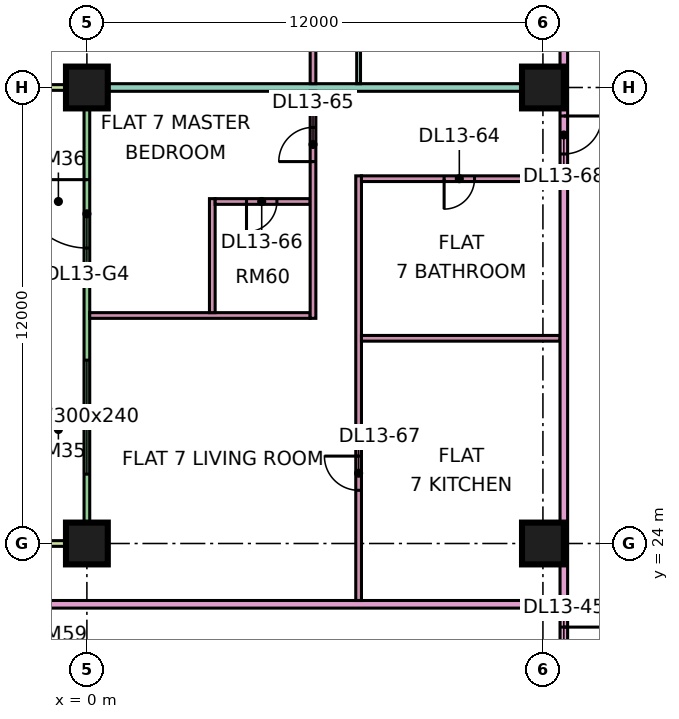
"""IFC4 building model, lengths in metres.
Left out: names, types, materials, properties, quantities, classifications, styles, units other than length and angle.
Written with IfcOpenShell. Run it as: python <this file> out.ifc"""

import sys

from ifc_helpers import new_model, si_unit, direction, frame, frame_2d, origin, origin_2d, place, context, subcontext, project, spatial, rectangle, extrude, element, fill, save


model = new_model("IFC4")
c1 = context("Model", 3, precision=1e-05, world=origin(), true_north=direction((0.0, 1.0)))
c2 = subcontext(c1, "Body", "Model", "MODEL_VIEW")
j1 = project(units=[si_unit("LENGTHUNIT", "METRE"), si_unit("PLANEANGLEUNIT", "RADIAN")], contexts=[c1])
p1 = place(None, origin())
s1 = spatial("IfcSite", under=j1, at=p1, CompositionType="ELEMENT")
p2 = place(p1, origin())
s2 = spatial("IfcBuilding", under=s1, at=p2, CompositionType="ELEMENT")
p3 = place(p2, frame((0.0, 0.0, 63.9)))
s3 = spatial("IfcBuildingStorey", under=s2, at=p3, CompositionType="ELEMENT", Elevation=63.9)
p4 = place(p3, frame((0.0, 24.0, 0.0), z_axis=(0.0, 0.0, 1.0), x_axis=(1.0, 0.0, 0.0)))
e1 = element("IfcColumn", 1, at=p4, inside=s3, PredefinedType="COLUMN", context=c2, shape_type="SweptSolid", body=[
    extrude(rectangle(XDim=1.1, YDim=1.1, at=origin_2d()), origin(), (0.0, 0.0, 1.0), 3.75),
])
p5 = place(p3, frame((0.0, 36.0, 0.0), z_axis=(0.0, 0.0, 1.0), x_axis=(1.0, 0.0, 0.0)))
e2 = element("IfcColumn", 2, at=p5, inside=s3, PredefinedType="COLUMN", context=c2, shape_type="SweptSolid", body=[
    extrude(rectangle(XDim=1.1, YDim=1.1, at=origin_2d()), origin(), (0.0, 0.0, 1.0), 3.75),
])
for number, where, z_axis, x_axis in (
    (3, (12.0, 24.0, 0.0), (0.0, 0.0, 1.0), (1.0, 0.0, 0.0)),
    (4, (12.0, 36.0, 0.0), (0.0, 0.0, 1.0), (1.0, 0.0, 0.0)),
):
    element("IfcColumn", number, at=place(p3, frame(where, z_axis=z_axis, x_axis=x_axis)), inside=s3, PredefinedType="COLUMN", context=c2, shape_type="SweptSolid", body=[
        extrude(rectangle(XDim=1.1, YDim=1.1, at=origin_2d()), origin(), (0.0, 0.0, 1.0), 3.75),
    ])
p6 = place(p3, frame((0.0, 35.925, 0.0), z_axis=(0.0, 0.0, 1.0), x_axis=(0.0, -1.0, 0.0)))
e5 = element("IfcWall", 5, at=p6, inside=s3, PredefinedType="SOLIDWALL", context=c2, shape_type="SweptSolid", body=[
    extrude(rectangle(XDim=11.85, YDim=0.15, at=frame_2d((5.925, 0.0))), origin(), (0.0, 0.0, 1.0), 3.35),
])
p7 = place(p6, frame((2.35, 0.0, 0.0)))
e6 = element("IfcOpeningElement", 6, at=p7, cuts=e5, PredefinedType="OPENING", context=c2, shape_type="SweptSolid", body=[
    extrude(rectangle(XDim=1.8, YDim=2.4, at=frame_2d((0.9, 1.2))), frame((0.0, 0.085, 0.0), z_axis=(0.0, -1.0, 0.0), x_axis=(1.0, 0.0, 0.0)), (0.0, 0.0, 1.0), 0.17),
])
p8 = place(p6, frame((7.1, 0.0, 0.45)))
e7 = element("IfcOpeningElement", 7, at=p8, cuts=e5, PredefinedType="OPENING", context=c2, shape_type="SweptSolid", body=[
    extrude(rectangle(XDim=3.0, YDim=2.4, at=frame_2d((1.5, 1.2))), frame((0.0, 0.085, 0.0), z_axis=(0.0, -1.0, 0.0), x_axis=(1.0, 0.0, 0.0)), (0.0, 0.0, 1.0), 0.17),
])
for number, where, z_axis, x_axis in (
    (8, (-1.5, 36.0, 0.0), (0.0, 0.0, 1.0), (1.0, 0.0, 0.0)),
    (9, (-1.5, 24.0, 0.0), (0.0, 0.0, 1.0), (1.0, 0.0, 0.0)),
):
    element("IfcWall", number, at=place(p3, frame(where, z_axis=z_axis, x_axis=x_axis)), inside=s3, PredefinedType="SOLIDWALL", context=c2, shape_type="SweptSolid", body=[
        extrude(rectangle(XDim=1.5, YDim=0.15, at=frame_2d((0.75, 0.0))), origin(), (0.0, 0.0, 1.0), 3.35),
    ])
p9 = place(p3, frame((-1.35, 22.4, 0.0), z_axis=(0.0, 0.0, 1.0), x_axis=(1.0, 0.0, 0.0)))
e10 = element("IfcWall", 10, at=p9, inside=s3, PredefinedType="PARTITIONING", context=c2, shape_type="SweptSolid", body=[
    extrude(rectangle(XDim=13.8, YDim=0.2, at=frame_2d((6.9, 0.0))), origin(), (0.0, 0.0, 1.0), 3.35),
])
e11 = element("IfcWall", 11, at=p5, inside=s3, PredefinedType="PARTITIONING", context=c2, shape_type="SweptSolid", body=[
    extrude(rectangle(XDim=12.45, YDim=0.2, at=frame_2d((6.225, 0.0))), origin(), (0.0, 0.0, 1.0), 3.35),
])
p10 = place(p3, frame((0.074, 30.0, 0.0), z_axis=(0.0, 0.0, 1.0), x_axis=(1.0, 0.0, 0.0)))
e12 = element("IfcWall", 12, at=p10, inside=s3, PredefinedType="PARTITIONING", context=c2, shape_type="SweptSolid", body=[
    extrude(rectangle(XDim=5.801, YDim=0.15, at=frame_2d((2.9, 0.0))), origin(), (0.0, 0.0, 1.0), 3.35),
])
p11 = place(p3, frame((3.3, 30.075, 0.0), z_axis=(0.0, 0.0, 1.0), x_axis=(0.0, 1.0, 0.0)))
e13 = element("IfcWall", 13, at=p11, inside=s3, PredefinedType="PARTITIONING", context=c2, shape_type="SweptSolid", body=[
    extrude(rectangle(XDim=3.0, YDim=0.15, at=frame_2d((1.5, 0.0))), origin(), (0.0, 0.0, 1.0), 3.35),
])
p12 = place(p3, frame((3.375, 33.0, 0.0), z_axis=(0.0, 0.0, 1.0), x_axis=(1.0, 0.0, 0.0)))
e14 = element("IfcWall", 14, at=p12, inside=s3, PredefinedType="PARTITIONING", context=c2, shape_type="SweptSolid", body=[
    extrude(rectangle(XDim=2.5, YDim=0.15, at=frame_2d((1.25, 0.0))), origin(), (0.0, 0.0, 1.0), 3.35),
])
p13 = place(p12, frame((0.825, 0.0, 0.0)))
e15 = element("IfcOpeningElement", 15, at=p13, cuts=e14, PredefinedType="OPENING", context=c2, shape_type="SweptSolid", body=[
    extrude(rectangle(XDim=0.8, YDim=2.1, at=frame_2d((0.4, 1.05))), frame((0.0, 0.085, 0.0), z_axis=(0.0, -1.0, 0.0), x_axis=(1.0, 0.0, 0.0)), (0.0, 0.0, 1.0), 0.17),
])
p14 = place(p3, frame((5.95, 29.925, 0.0), z_axis=(0.0, 0.0, 1.0), x_axis=(0.0, 1.0, 0.0)))
e16 = element("IfcWall", 16, at=p14, inside=s3, PredefinedType="PARTITIONING", context=c2, shape_type="SweptSolid", body=[
    extrude(rectangle(XDim=5.975, YDim=0.15, at=frame_2d((2.987, 0.0))), origin(), (0.0, 0.0, 1.0), 3.35),
])
p15 = place(p14, frame((4.125, 0.0, 0.0)))
e17 = element("IfcOpeningElement", 17, at=p15, cuts=e16, PredefinedType="OPENING", context=c2, shape_type="SweptSolid", body=[
    extrude(rectangle(XDim=0.9, YDim=2.1, at=frame_2d((0.45, 1.05))), frame((0.0, 0.085, 0.0), z_axis=(0.0, -1.0, 0.0), x_axis=(1.0, 0.0, 0.0)), (0.0, 0.0, 1.0), 0.17),
])
p16 = place(p3, frame((5.95, 36.1, 0.0), z_axis=(0.0, 0.0, 1.0), x_axis=(0.0, 1.0, 0.0)))
e18 = element("IfcWall", 18, at=p16, inside=s3, PredefinedType="PARTITIONING", context=c2, shape_type="SweptSolid", body=[
    extrude(rectangle(XDim=26.826, YDim=0.15, at=frame_2d((13.413, 0.0))), origin(), (0.0, 0.0, 1.0), 3.35),
])
p17 = place(p16, frame((0.95, 0.0, 0.0)))
e19 = element("IfcOpeningElement", 19, at=p17, cuts=e18, PredefinedType="OPENING", context=c2, shape_type="SweptSolid", body=[
    extrude(rectangle(XDim=0.9, YDim=2.1, at=frame_2d((0.45, 1.05))), frame((0.0, 0.085, 0.0), z_axis=(0.0, -1.0, 0.0), x_axis=(1.0, 0.0, 0.0)), (0.0, 0.0, 1.0), 0.17),
])
p18 = place(p16, frame((3.95, 0.0, 0.0)))
e20 = element("IfcOpeningElement", 20, at=p18, cuts=e18, PredefinedType="OPENING", context=c2, shape_type="SweptSolid", body=[
    extrude(rectangle(XDim=0.9, YDim=2.1, at=frame_2d((0.45, 1.05))), frame((0.0, 0.085, 0.0), z_axis=(0.0, -1.0, 0.0), x_axis=(1.0, 0.0, 0.0)), (0.0, 0.0, 1.0), 0.17),
])
p19 = place(p16, frame((6.95, 0.0, 0.0)))
e21 = element("IfcOpeningElement", 21, at=p19, cuts=e18, PredefinedType="OPENING", context=c2, shape_type="SweptSolid", body=[
    extrude(rectangle(XDim=0.9, YDim=2.1, at=frame_2d((0.45, 1.05))), frame((0.0, 0.085, 0.0), z_axis=(0.0, -1.0, 0.0), x_axis=(1.0, 0.0, 0.0)), (0.0, 0.0, 1.0), 0.17),
])
p20 = place(p16, frame((9.95, 0.0, 0.0)))
e22 = element("IfcOpeningElement", 22, at=p20, cuts=e18, PredefinedType="OPENING", context=c2, shape_type="SweptSolid", body=[
    extrude(rectangle(XDim=0.9, YDim=2.1, at=frame_2d((0.45, 1.05))), frame((0.0, 0.085, 0.0), z_axis=(0.0, -1.0, 0.0), x_axis=(1.0, 0.0, 0.0)), (0.0, 0.0, 1.0), 0.17),
])
p21 = place(p16, frame((18.95, 0.0, 0.0)))
e23 = element("IfcOpeningElement", 23, at=p21, cuts=e18, PredefinedType="OPENING", context=c2, shape_type="SweptSolid", body=[
    extrude(rectangle(XDim=0.9, YDim=2.1, at=frame_2d((0.45, 1.05))), frame((0.0, 0.085, 0.0), z_axis=(0.0, -1.0, 0.0), x_axis=(1.0, 0.0, 0.0)), (0.0, 0.0, 1.0), 0.17),
])
p22 = place(p16, frame((23.45, 0.0, 0.0)))
e24 = element("IfcOpeningElement", 24, at=p22, cuts=e18, PredefinedType="OPENING", context=c2, shape_type="SweptSolid", body=[
    extrude(rectangle(XDim=0.9, YDim=2.1, at=frame_2d((0.45, 1.05))), frame((0.0, 0.085, 0.0), z_axis=(0.0, -1.0, 0.0), x_axis=(1.0, 0.0, 0.0)), (0.0, 0.0, 1.0), 0.17),
])
p23 = place(p16, frame((15.55, 0.0, 0.0)))
e25 = element("IfcOpeningElement", 25, at=p23, cuts=e18, PredefinedType="OPENING", context=c2, shape_type="SweptSolid", body=[
    extrude(rectangle(XDim=1.6, YDim=2.1, at=frame_2d((0.8, 1.05))), frame((0.0, 0.085, 0.0), z_axis=(0.0, -1.0, 0.0), x_axis=(1.0, 0.0, 0.0)), (0.0, 0.0, 1.0), 0.17),
])
p24 = place(p16, frame((12.95, 0.0, 0.0)))
e26 = element("IfcOpeningElement", 26, at=p24, cuts=e18, PredefinedType="OPENING", context=c2, shape_type="SweptSolid", body=[
    extrude(rectangle(XDim=0.9, YDim=2.1, at=frame_2d((0.45, 1.05))), frame((0.0, 0.085, 0.0), z_axis=(0.0, -1.0, 0.0), x_axis=(1.0, 0.0, 0.0)), (0.0, 0.0, 1.0), 0.17),
])
p25 = place(p3, frame((7.15, 22.5, 0.0), z_axis=(0.0, 0.0, 1.0), x_axis=(0.0, 1.0, 0.0)))
e27 = element("IfcWall", 27, at=p25, inside=s3, PredefinedType="PARTITIONING", context=c2, shape_type="SweptSolid", body=[
    extrude(rectangle(XDim=11.175, YDim=0.15, at=frame_2d((5.587, 0.0))), origin(), (0.0, 0.0, 1.0), 3.35),
])
p26 = place(p25, frame((2.9, 0.0, 0.0)))
e28 = element("IfcOpeningElement", 28, at=p26, cuts=e27, PredefinedType="OPENING", context=c2, shape_type="SweptSolid", body=[
    extrude(rectangle(XDim=0.9, YDim=2.1, at=frame_2d((0.45, 1.05))), frame((0.0, 0.085, 0.0), z_axis=(0.0, -1.0, 0.0), x_axis=(1.0, 0.0, 0.0)), (0.0, 0.0, 1.0), 0.17),
])
p27 = place(p3, frame((7.15, 36.1, 0.0), z_axis=(0.0, 0.0, 1.0), x_axis=(0.0, 1.0, 0.0)))
e29 = element("IfcWall", 29, at=p27, inside=s3, PredefinedType="PARTITIONING", context=c2, shape_type="SweptSolid", body=[
    extrude(rectangle(XDim=8.35, YDim=0.1, at=frame_2d((4.175, 0.0))), origin(), (0.0, 0.0, 1.0), 3.35),
])
p28 = place(p27, frame((3.65, 0.0, 0.0)))
e30 = element("IfcOpeningElement", 30, at=p28, cuts=e29, PredefinedType="OPENING", context=c2, shape_type="SweptSolid", body=[
    extrude(rectangle(XDim=0.9, YDim=2.1, at=frame_2d((0.45, 1.05))), frame((0.0, 0.06, 0.0), z_axis=(0.0, -1.0, 0.0), x_axis=(1.0, 0.0, 0.0)), (0.0, 0.0, 1.0), 0.12),
])
p29 = place(p3, frame((7.225, 29.4, 0.0), z_axis=(0.0, 0.0, 1.0), x_axis=(1.0, 0.0, 0.0)))
e31 = element("IfcWall", 31, at=p29, inside=s3, PredefinedType="PARTITIONING", context=c2, shape_type="SweptSolid", body=[
    extrude(rectangle(XDim=5.225, YDim=0.15, at=frame_2d((2.612, 0.0))), origin(), (0.0, 0.0, 1.0), 3.35),
])
p30 = place(p3, frame((7.225, 33.6, 0.0), z_axis=(0.0, 0.0, 1.0), x_axis=(1.0, 0.0, 0.0)))
e32 = element("IfcWall", 32, at=p30, inside=s3, PredefinedType="PARTITIONING", context=c2, shape_type="SweptSolid", body=[
    extrude(rectangle(XDim=5.225, YDim=0.15, at=frame_2d((2.612, 0.0))), origin(), (0.0, 0.0, 1.0), 3.35),
])
p31 = place(p30, frame((2.175, 0.0, 0.0)))
e33 = element("IfcOpeningElement", 33, at=p31, cuts=e32, PredefinedType="OPENING", context=c2, shape_type="SweptSolid", body=[
    extrude(rectangle(XDim=0.8, YDim=2.1, at=frame_2d((0.4, 1.05))), frame((0.0, 0.085, 0.0), z_axis=(0.0, -1.0, 0.0), x_axis=(1.0, 0.0, 0.0)), (0.0, 0.0, 1.0), 0.17),
])
p32 = place(p3, frame((12.55, 20.0, 0.0), z_axis=(0.0, 0.0, 1.0), x_axis=(0.0, 1.0, 0.0)))
e34 = element("IfcWall", 34, at=p32, inside=s3, PredefinedType="PARTITIONING", context=c2, shape_type="SweptSolid", body=[
    extrude(rectangle(XDim=43.0, YDim=0.2, at=frame_2d((21.5, 0.0))), origin(), (0.0, 0.0, 1.0), 3.35),
])
p33 = place(p32, frame((25.8, 0.0, 0.0)))
e35 = element("IfcOpeningElement", 35, at=p33, cuts=e34, PredefinedType="OPENING", context=c2, shape_type="SweptSolid", body=[
    extrude(rectangle(XDim=1.0, YDim=2.1, at=frame_2d((0.5, 1.05))), frame((0.0, 0.11, 0.0), z_axis=(0.0, -1.0, 0.0), x_axis=(1.0, 0.0, 0.0)), (0.0, 0.0, 1.0), 0.22),
])
p34 = place(p32, frame((0.6, 0.0, 0.0)))
e36 = element("IfcOpeningElement", 36, at=p34, cuts=e34, PredefinedType="OPENING", context=c2, shape_type="SweptSolid", body=[
    extrude(rectangle(XDim=1.2, YDim=2.1, at=frame_2d((0.6, 1.05))), frame((0.0, 0.11, 0.0), z_axis=(0.0, -1.0, 0.0), x_axis=(1.0, 0.0, 0.0)), (0.0, 0.0, 1.0), 0.22),
])
p35 = place(p32, frame((14.25, 0.0, 0.0)))
e37 = element("IfcOpeningElement", 37, at=p35, cuts=e34, PredefinedType="OPENING", context=c2, shape_type="SweptSolid", body=[
    extrude(rectangle(XDim=1.0, YDim=2.1, at=frame_2d((0.5, 1.05))), frame((0.0, 0.11, 0.0), z_axis=(0.0, -1.0, 0.0), x_axis=(1.0, 0.0, 0.0)), (0.0, 0.0, 1.0), 0.22),
])
p36 = place(p7, frame((1.8, 0.0, 0.0), z_axis=(0.0, 0.0, 1.0), x_axis=(-1.0, 0.0, 0.0)))
e38 = element("IfcDoor", 38, at=p36, inside=s3, OperationType="DOUBLE_DOOR_SINGLE_SWING", PredefinedType="DOOR", context=c2, shape_type="SweptSolid", body=[
    extrude(rectangle(XDim=1.8, YDim=2.4, at=frame_2d((0.9, 1.2))), frame((0.0, 0.025, 0.0), z_axis=(0.0, -1.0, 0.0), x_axis=(1.0, 0.0, 0.0)), (0.0, 0.0, 1.0), 0.05),
])
fill(e6, e38)
p37 = place(p8, origin())
e39 = element("IfcWindow", 39, at=p37, inside=s3, PartitioningType="SINGLE_PANEL", PredefinedType="WINDOW", context=c2, shape_type="SweptSolid", body=[
    extrude(rectangle(XDim=3.0, YDim=2.4, at=frame_2d((1.5, 1.2))), frame((0.0, 0.03, 0.0), z_axis=(0.0, -1.0, 0.0), x_axis=(1.0, 0.0, 0.0)), (0.0, 0.0, 1.0), 0.06),
])
fill(e7, e39)
p38 = place(p34, origin())
e40 = element("IfcDoor", 40, at=p38, inside=s3, OperationType="SINGLE_SWING_RIGHT", PredefinedType="DOOR", context=c2, shape_type="SweptSolid", body=[
    extrude(rectangle(XDim=1.2, YDim=2.1, at=frame_2d((0.6, 1.05))), frame((0.0, 0.025, 0.0), z_axis=(0.0, -1.0, 0.0), x_axis=(1.0, 0.0, 0.0)), (0.0, 0.0, 1.0), 0.05),
])
fill(e36, e40)
p39 = place(p31, frame((0.8, 0.0, 0.0), z_axis=(0.0, 0.0, 1.0), x_axis=(-1.0, 0.0, 0.0)))
e41 = element("IfcDoor", 41, at=p39, inside=s3, OperationType="SINGLE_SWING_LEFT", PredefinedType="DOOR", context=c2, shape_type="SweptSolid", body=[
    extrude(rectangle(XDim=0.8, YDim=2.1, at=frame_2d((0.4, 1.05))), frame((0.0, 0.025, 0.0), z_axis=(0.0, -1.0, 0.0), x_axis=(1.0, 0.0, 0.0)), (0.0, 0.0, 1.0), 0.05),
])
fill(e33, e41)
p40 = place(p15, origin())
e42 = element("IfcDoor", 42, at=p40, inside=s3, OperationType="SINGLE_SWING_LEFT", PredefinedType="DOOR", context=c2, shape_type="SweptSolid", body=[
    extrude(rectangle(XDim=0.9, YDim=2.1, at=frame_2d((0.45, 1.05))), frame((0.0, 0.025, 0.0), z_axis=(0.0, -1.0, 0.0), x_axis=(1.0, 0.0, 0.0)), (0.0, 0.0, 1.0), 0.05),
])
fill(e17, e42)
p41 = place(p13, frame((0.8, 0.0, 0.0), z_axis=(0.0, 0.0, 1.0), x_axis=(-1.0, 0.0, 0.0)))
e43 = element("IfcDoor", 43, at=p41, inside=s3, OperationType="SINGLE_SWING_LEFT", PredefinedType="DOOR", context=c2, shape_type="SweptSolid", body=[
    extrude(rectangle(XDim=0.8, YDim=2.1, at=frame_2d((0.4, 1.05))), frame((0.0, 0.025, 0.0), z_axis=(0.0, -1.0, 0.0), x_axis=(1.0, 0.0, 0.0)), (0.0, 0.0, 1.0), 0.05),
])
fill(e15, e43)
p42 = place(p26, frame((0.9, 0.0, 0.0), z_axis=(0.0, 0.0, 1.0), x_axis=(-1.0, 0.0, 0.0)))
e44 = element("IfcDoor", 44, at=p42, inside=s3, OperationType="SINGLE_SWING_RIGHT", PredefinedType="DOOR", context=c2, shape_type="SweptSolid", body=[
    extrude(rectangle(XDim=0.9, YDim=2.1, at=frame_2d((0.45, 1.05))), frame((0.0, 0.025, 0.0), z_axis=(0.0, -1.0, 0.0), x_axis=(1.0, 0.0, 0.0)), (0.0, 0.0, 1.0), 0.05),
])
fill(e28, e44)
p43 = place(p35, origin())
e45 = element("IfcDoor", 45, at=p43, inside=s3, OperationType="SINGLE_SWING_RIGHT", PredefinedType="DOOR", context=c2, shape_type="SweptSolid", body=[
    extrude(rectangle(XDim=1.0, YDim=2.1, at=frame_2d((0.5, 1.05))), frame((0.0, 0.025, 0.0), z_axis=(0.0, -1.0, 0.0), x_axis=(1.0, 0.0, 0.0)), (0.0, 0.0, 1.0), 0.05),
])
fill(e37, e45)
save(model, sys.argv[1])
